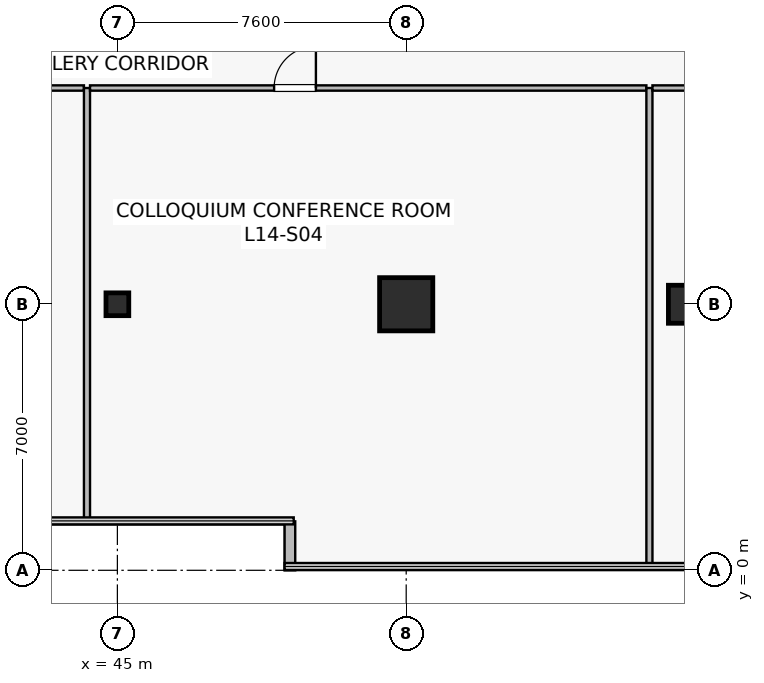
"""IFC4 building model, lengths in metres.
Left out: names, types, materials, properties, quantities, classifications, styles, units other than length and angle.
Written with IfcOpenShell. Run it as: python <this file> out.ifc"""

import sys

from ifc_helpers import new_model, si_unit, direction, frame, frame_2d, origin, origin_2d, place, context, subcontext, project, spatial, rectangle, hollow_rectangle, extrude, source, transform, mapped, element, fill, save


model = new_model("IFC4")
c1 = context("Model", 3, precision=1e-05, world=origin(), true_north=direction((0.0, 1.0)))
c2 = subcontext(c1, "Body", "Model", "MODEL_VIEW")
j1 = project(units=[si_unit("LENGTHUNIT", "METRE"), si_unit("PLANEANGLEUNIT", "RADIAN")], contexts=[c1])
p1 = place(None, origin())
s1 = spatial("IfcSite", under=j1, at=p1, CompositionType="ELEMENT")
p2 = place(p1, origin())
s2 = spatial("IfcBuilding", under=s1, at=p2, CompositionType="ELEMENT")
p3 = place(p2, frame((0.0, 0.0, 58.0)))
s3 = spatial("IfcBuildingStorey", under=s2, at=p3, CompositionType="ELEMENT", Elevation=58.0)
m1 = source(origin(), c2, "Body", "SweptSolid", [
    extrude(rectangle(XDim=1.4, YDim=1.4, at=origin_2d()), origin(), (0.0, 0.0, 1.0), 4.1),
])
p4 = place(p3, frame((52.6, 7.0, 0.0), z_axis=(0.0, 0.0, 1.0), x_axis=(1.0, 0.0, 0.0)))
e1 = element("IfcColumn", 1, at=p4, inside=s3, PredefinedType="COLUMN", context=c2, shape_type="MappedRepresentation", body=[
    mapped(m1, transform((0.0, 0.0, 0.0), scale=1.0)),
])
m2 = source(origin(), c2, "Body", "SweptSolid", [
    extrude(rectangle(XDim=1.0, YDim=1.0, at=origin_2d()), origin(), (0.0, 0.0, 1.0), 4.1),
])
p5 = place(p3, frame((60.0, 7.0, 0.0), z_axis=(0.0, 0.0, 1.0), x_axis=(1.0, 0.0, 0.0)))
e2 = element("IfcColumn", 2, at=p5, inside=s3, PredefinedType="COLUMN", context=c2, shape_type="MappedRepresentation", body=[
    mapped(m2, transform((0.0, 0.0, 0.0), scale=1.0)),
])
m3 = source(origin(), c2, "Body", "SweptSolid", [
    extrude(hollow_rectangle(XDim=0.6, YDim=0.6, WallThickness=0.028, at=origin_2d()), origin(), (0.0, 0.0, 1.0), 4.1),
])
p6 = place(p3, frame((45.0, 7.0, 0.0), z_axis=(0.0, 0.0, 1.0), x_axis=(1.0, 0.0, 0.0)))
e3 = element("IfcColumn", 3, at=p6, inside=s3, PredefinedType="COLUMN", context=c2, shape_type="MappedRepresentation", body=[
    mapped(m3, transform((0.0, 0.0, 0.0), scale=1.0)),
])
p7 = place(p3, frame((49.54, 1.288, 0.0), z_axis=(0.0, 0.0, 1.0), x_axis=(0.0, -1.0, 0.0)))
e4 = element("IfcWall", 4, at=p7, inside=s3, PredefinedType="STANDARD", context=c2, shape_type="SweptSolid", body=[
    extrude(rectangle(XDim=1.288, YDim=0.28, at=frame_2d((0.644, 0.0))), origin(), (0.0, 0.0, 1.0), 3.78),
])
p8 = place(p3, frame((30.28, 12.69, 0.0), z_axis=(0.0, 0.0, 1.0), x_axis=(1.0, 0.0, 0.0)))
e5 = element("IfcWall", 5, at=p8, inside=s3, PredefinedType="PARTITIONING", context=c2, shape_type="SweptSolid", body=[
    extrude(rectangle(XDim=13.84, YDim=0.14, at=frame_2d((6.92, 0.0))), origin(), (0.0, 0.0, 1.0), 3.065),
])
p9 = place(p8, frame((5.648, 0.0, 0.0)))
e6 = element("IfcOpeningElement", 6, at=p9, cuts=e5, PredefinedType="OPENING", context=c2, shape_type="SweptSolid", body=[
    extrude(rectangle(XDim=1.1, YDim=2.18, at=frame_2d((0.55, 1.09))), frame((0.0, 0.08, 0.0), z_axis=(0.0, -1.0, 0.0), x_axis=(1.0, 0.0, 0.0)), (0.0, 0.0, 1.0), 0.16),
])
p10 = place(p3, frame((44.2, 1.31, 0.0), z_axis=(0.0, 0.0, 1.0), x_axis=(0.0, 1.0, 0.0)))
e7 = element("IfcWall", 7, at=p10, inside=s3, PredefinedType="PARTITIONING", context=c2, shape_type="SweptSolid", body=[
    extrude(rectangle(XDim=11.38, YDim=0.16, at=frame_2d((5.69, 0.0))), origin(), (0.0, 0.0, 1.0), 3.015),
])
p11 = place(p3, frame((44.28, 12.69, 0.0), z_axis=(0.0, 0.0, 1.0), x_axis=(1.0, 0.0, 0.0)))
e8 = element("IfcWall", 8, at=p11, inside=s3, PredefinedType="PARTITIONING", context=c2, shape_type="SweptSolid", body=[
    extrude(rectangle(XDim=14.64, YDim=0.14, at=frame_2d((7.32, 0.0))), origin(), (0.0, 0.0, 1.0), 3.065),
])
p12 = place(p11, frame((4.844, 0.0, 0.0)))
e9 = element("IfcOpeningElement", 9, at=p12, cuts=e8, PredefinedType="OPENING", context=c2, shape_type="SweptSolid", body=[
    extrude(rectangle(XDim=1.1, YDim=2.18, at=frame_2d((0.55, 1.09))), frame((0.0, 0.08, 0.0), z_axis=(0.0, -1.0, 0.0), x_axis=(1.0, 0.0, 0.0)), (0.0, 0.0, 1.0), 0.16),
])
p13 = place(p3, frame((59.0, 0.11, 0.0), z_axis=(0.0, 0.0, 1.0), x_axis=(0.0, 1.0, 0.0)))
e10 = element("IfcWall", 10, at=p13, inside=s3, PredefinedType="PARTITIONING", context=c2, shape_type="SweptSolid", body=[
    extrude(rectangle(XDim=12.58, YDim=0.16, at=frame_2d((6.29, 0.0))), origin(), (0.0, 0.0, 1.0), 3.015),
])
p14 = place(p3, frame((59.08, 12.69, 0.0), z_axis=(0.0, 0.0, 1.0), x_axis=(1.0, 0.0, 0.0)))
e11 = element("IfcWall", 11, at=p14, inside=s3, PredefinedType="PARTITIONING", context=c2, shape_type="SweptSolid", body=[
    extrude(rectangle(XDim=8.74, YDim=0.14, at=frame_2d((4.37, 0.0))), origin(), (0.0, 0.0, 1.0), 3.065),
])
p15 = place(p14, frame((3.404, 0.0, 0.0)))
e12 = element("IfcOpeningElement", 12, at=p15, cuts=e11, PredefinedType="OPENING", context=c2, shape_type="SweptSolid", body=[
    extrude(rectangle(XDim=1.1, YDim=2.18, at=frame_2d((0.55, 1.09))), frame((0.0, 0.08, 0.0), z_axis=(0.0, -1.0, 0.0), x_axis=(1.0, 0.0, 0.0)), (0.0, 0.0, 1.0), 0.16),
])
m4 = source(origin(), c2, "Body", "SweptSolid", [
    extrude(rectangle(XDim=1.1, YDim=2.18, at=frame_2d((0.55, 1.09))), frame((0.0, 0.025, 0.0), z_axis=(0.0, -1.0, 0.0), x_axis=(1.0, 0.0, 0.0)), (0.0, 0.0, 1.0), 0.05),
])
p16 = place(p12, origin())
e13 = element("IfcDoor", 13, at=p16, inside=s3, OperationType="SINGLE_SWING_RIGHT", PredefinedType="DOOR", context=c2, shape_type="MappedRepresentation", body=[
    mapped(m4, transform((0.0, 0.0, 0.0), scale=1.0)),
])
fill(e9, e13)
save(model, sys.argv[1])
